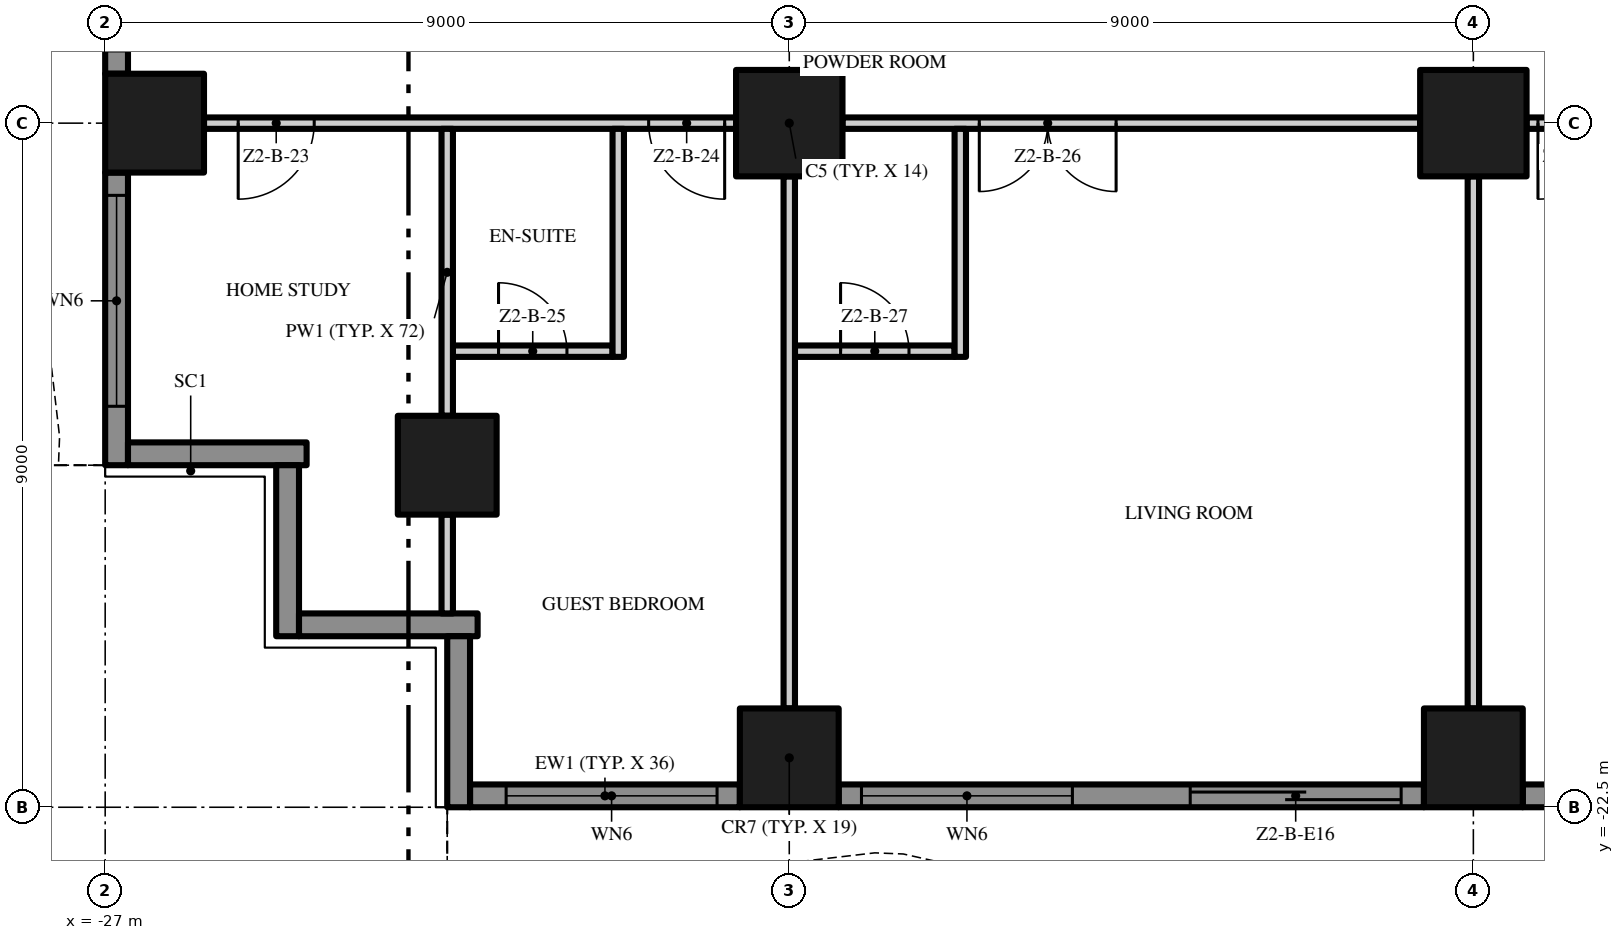
"""IFC4 building model, lengths in metres.
Left out: names, types, materials, properties, quantities, classifications, styles, units other than length and angle.
Written with IfcOpenShell. Run it as: python <this file> out.ifc"""

import sys

from ifc_helpers import new_model, si_unit, direction, frame, frame_2d, origin, origin_2d, place, context, subcontext, project, spatial, polyline, rectangle, outline, extrude, element, fill, save


model = new_model("IFC4")
c1 = context("Model", 3, precision=1e-05, world=origin(), true_north=direction((0.0, 1.0)))
c2 = subcontext(c1, "Body", "Model", "MODEL_VIEW")
j1 = project(units=[si_unit("LENGTHUNIT", "METRE"), si_unit("PLANEANGLEUNIT", "RADIAN")], contexts=[c1])
p1 = place(None, origin())
s1 = spatial("IfcSite", under=j1, at=p1, CompositionType="ELEMENT")
p2 = place(p1, origin())
s2 = spatial("IfcBuilding", under=s1, at=p2, CompositionType="ELEMENT")
p3 = place(p2, frame((0.0, 0.0, 88.4)))
s3 = spatial("IfcBuildingStorey", under=s2, at=p3, CompositionType="ELEMENT", Elevation=88.4)
p4 = place(p3, frame((-18.0, -13.5, 0.0), z_axis=(0.0, 0.0, 1.0), x_axis=(1.0, 0.0, 0.0)))
e1 = element("IfcColumn", 1, at=p4, inside=s3, PredefinedType="COLUMN", context=c2, shape_type="SweptSolid", body=[
    extrude(rectangle(XDim=1.4, YDim=1.4, at=origin_2d()), origin(), (0.0, 0.0, 1.0), 3.5),
])
for number, where, z_axis, x_axis in (
    (2, (-18.0, -21.85, 0.0), (0.0, 0.0, 1.0), (1.0, 0.0, 0.0)),
    (3, (-26.35, -13.5, 0.0), (0.0, 0.0, 1.0), (1.0, 0.0, 0.0)),
    (4, (-22.5, -18.0, 0.0), (0.0, 0.0, 1.0), (1.0, 0.0, 0.0)),
):
    element("IfcColumn", number, at=place(p3, frame(where, z_axis=z_axis, x_axis=x_axis)), inside=s3, PredefinedType="COLUMN", context=c2, shape_type="SweptSolid", body=[
        extrude(rectangle(XDim=1.3, YDim=1.3, at=origin_2d()), origin(), (0.0, 0.0, 1.0), 3.5),
    ])
p5 = place(p3, frame((-9.0, -13.5, 0.0), z_axis=(0.0, 0.0, 1.0), x_axis=(1.0, 0.0, 0.0)))
e5 = element("IfcColumn", 5, at=p5, inside=s3, PredefinedType="COLUMN", context=c2, shape_type="SweptSolid", body=[
    extrude(rectangle(XDim=1.4, YDim=1.4, at=origin_2d()), origin(), (0.0, 0.0, 1.0), 3.5),
])
p6 = place(p3, frame((-9.0, -21.85, 0.0), z_axis=(0.0, 0.0, 1.0), x_axis=(1.0, 0.0, 0.0)))
e6 = element("IfcColumn", 6, at=p6, inside=s3, PredefinedType="COLUMN", context=c2, shape_type="SweptSolid", body=[
    extrude(rectangle(XDim=1.3, YDim=1.3, at=origin_2d()), origin(), (0.0, 0.0, 1.0), 3.5),
])
p7 = place(p3, frame((-18.65, -22.35, 0.0), z_axis=(0.0, 0.0, 1.0), x_axis=(-1.0, 0.0, 0.0)))
e7 = element("IfcWall", 7, at=p7, inside=s3, PredefinedType="SOLIDWALL", context=c2, shape_type="SweptSolid", body=[
    extrude(rectangle(XDim=3.55, YDim=0.3, at=frame_2d((1.775, 0.0))), origin(), (0.0, 0.0, 1.0), 3.5),
])
p8 = place(p7, frame((0.3, 0.0, 0.45)))
e8 = element("IfcOpeningElement", 8, at=p8, cuts=e7, PredefinedType="OPENING", context=c2, shape_type="SweptSolid", body=[
    extrude(rectangle(XDim=2.775, YDim=2.65, at=frame_2d((1.387, 1.325))), frame((0.0, 0.16, 0.0), z_axis=(0.0, -1.0, 0.0), x_axis=(1.0, 0.0, 0.0)), (0.0, 0.0, 1.0), 0.32),
])
p9 = place(p3, frame((-9.65, -22.35, 0.0), z_axis=(0.0, 0.0, 1.0), x_axis=(-1.0, 0.0, 0.0)))
e9 = element("IfcWall", 9, at=p9, inside=s3, PredefinedType="SOLIDWALL", context=c2, shape_type="SweptSolid", body=[
    extrude(rectangle(XDim=7.7, YDim=0.3, at=frame_2d((3.85, 0.0))), origin(), (0.0, 0.0, 1.0), 3.5),
])
p10 = place(p9, frame((4.625, 0.0, 0.45)))
e10 = element("IfcOpeningElement", 10, at=p10, cuts=e9, PredefinedType="OPENING", context=c2, shape_type="SweptSolid", body=[
    extrude(rectangle(XDim=2.775, YDim=2.65, at=frame_2d((1.387, 1.325))), frame((0.0, 0.16, 0.0), z_axis=(0.0, -1.0, 0.0), x_axis=(1.0, 0.0, 0.0)), (0.0, 0.0, 1.0), 0.32),
])
p11 = place(p9, frame((0.3, 0.0, 0.0)))
e11 = element("IfcOpeningElement", 11, at=p11, cuts=e9, PredefinedType="OPENING", context=c2, shape_type="SweptSolid", body=[
    extrude(rectangle(XDim=2.775, YDim=2.4, at=frame_2d((1.387, 1.2))), frame((0.0, 0.16, 0.0), z_axis=(0.0, -1.0, 0.0), x_axis=(1.0, 0.0, 0.0)), (0.0, 0.0, 1.0), 0.32),
])
p12 = place(p3, frame((-0.65, -22.35, 0.0), z_axis=(0.0, 0.0, 1.0), x_axis=(-1.0, 0.0, 0.0)))
e12 = element("IfcWall", 12, at=p12, inside=s3, PredefinedType="SOLIDWALL", context=c2, shape_type="SweptSolid", body=[
    extrude(rectangle(XDim=7.7, YDim=0.3, at=frame_2d((3.85, 0.0))), origin(), (0.0, 0.0, 1.0), 3.5),
])
p13 = place(p12, frame((4.625, 0.0, 0.0)))
e13 = element("IfcOpeningElement", 13, at=p13, cuts=e12, PredefinedType="OPENING", context=c2, shape_type="SweptSolid", body=[
    extrude(rectangle(XDim=2.775, YDim=2.4, at=frame_2d((1.387, 1.2))), frame((0.0, 0.16, 0.0), z_axis=(0.0, -1.0, 0.0), x_axis=(1.0, 0.0, 0.0)), (0.0, 0.0, 1.0), 0.32),
])
p14 = place(p12, frame((0.3, 0.0, 0.45)))
e14 = element("IfcOpeningElement", 14, at=p14, cuts=e12, PredefinedType="OPENING", context=c2, shape_type="SweptSolid", body=[
    extrude(rectangle(XDim=2.775, YDim=2.65, at=frame_2d((1.387, 1.325))), frame((0.0, 0.16, 0.0), z_axis=(0.0, -1.0, 0.0), x_axis=(1.0, 0.0, 0.0)), (0.0, 0.0, 1.0), 0.32),
])
p15 = place(p3, frame((-26.85, -12.85, 0.0), z_axis=(0.0, 0.0, 1.0), x_axis=(0.0, 1.0, 0.0)))
e15 = element("IfcWall", 15, at=p15, inside=s3, PredefinedType="SOLIDWALL", context=c2, shape_type="SweptSolid", body=[
    extrude(rectangle(XDim=7.7, YDim=0.3, at=frame_2d((3.85, 0.0))), origin(), (0.0, 0.0, 1.0), 3.5),
])
p16 = place(p15, frame((4.625, 0.0, 0.45)))
e16 = element("IfcOpeningElement", 16, at=p16, cuts=e15, PredefinedType="OPENING", context=c2, shape_type="SweptSolid", body=[
    extrude(rectangle(XDim=2.775, YDim=2.65, at=frame_2d((1.387, 1.325))), frame((0.0, 0.16, 0.0), z_axis=(0.0, -1.0, 0.0), x_axis=(1.0, 0.0, 0.0)), (0.0, 0.0, 1.0), 0.32),
])
p17 = place(p15, frame((0.3, 0.0, 0.0)))
e17 = element("IfcOpeningElement", 17, at=p17, cuts=e15, PredefinedType="OPENING", context=c2, shape_type="SweptSolid", body=[
    extrude(rectangle(XDim=2.775, YDim=2.4, at=frame_2d((1.387, 1.2))), frame((0.0, 0.16, 0.0), z_axis=(0.0, -1.0, 0.0), x_axis=(1.0, 0.0, 0.0)), (0.0, 0.0, 1.0), 0.32),
])
p18 = place(p3, frame((-26.85, -18.0, 0.0), z_axis=(0.0, 0.0, 1.0), x_axis=(0.0, 1.0, 0.0)))
e18 = element("IfcWall", 18, at=p18, inside=s3, PredefinedType="SOLIDWALL", context=c2, shape_type="SweptSolid", body=[
    extrude(rectangle(XDim=3.85, YDim=0.3, at=frame_2d((1.925, 0.0))), origin(), (0.0, 0.0, 1.0), 3.5),
])
p19 = place(p18, frame((0.775, 0.0, 0.45)))
e19 = element("IfcOpeningElement", 19, at=p19, cuts=e18, PredefinedType="OPENING", context=c2, shape_type="SweptSolid", body=[
    extrude(rectangle(XDim=2.775, YDim=2.65, at=frame_2d((1.387, 1.325))), frame((0.0, 0.16, 0.0), z_axis=(0.0, -1.0, 0.0), x_axis=(1.0, 0.0, 0.0)), (0.0, 0.0, 1.0), 0.32),
])
p20 = place(p3, frame((-24.35, -17.85, 0.0), z_axis=(0.0, 0.0, 1.0), x_axis=(-1.0, 0.0, 0.0)))
e20 = element("IfcWall", 20, at=p20, inside=s3, PredefinedType="SOLIDWALL", context=c2, shape_type="SweptSolid", body=[
    extrude(rectangle(XDim=2.35, YDim=0.3, at=frame_2d((1.175, 0.0))), origin(), (0.0, 0.0, 1.0), 3.5),
])
p21 = place(p3, frame((-24.6, -20.25, 0.0), z_axis=(0.0, 0.0, 1.0), x_axis=(0.0, 1.0, 0.0)))
e21 = element("IfcWall", 21, at=p21, inside=s3, PredefinedType="SOLIDWALL", context=c2, shape_type="SweptSolid", body=[
    extrude(rectangle(XDim=2.25, YDim=0.3, at=frame_2d((1.125, 0.0))), origin(), (0.0, 0.0, 1.0), 3.5),
])
p22 = place(p3, frame((-22.1, -20.1, 0.0), z_axis=(0.0, 0.0, 1.0), x_axis=(-1.0, 0.0, 0.0)))
e22 = element("IfcWall", 22, at=p22, inside=s3, PredefinedType="SOLIDWALL", context=c2, shape_type="SweptSolid", body=[
    extrude(rectangle(XDim=2.35, YDim=0.3, at=frame_2d((1.175, 0.0))), origin(), (0.0, 0.0, 1.0), 3.5),
])
p23 = place(p3, frame((-22.35, -22.5, 0.0), z_axis=(0.0, 0.0, 1.0), x_axis=(0.0, 1.0, 0.0)))
e23 = element("IfcWall", 23, at=p23, inside=s3, PredefinedType="SOLIDWALL", context=c2, shape_type="SweptSolid", body=[
    extrude(rectangle(XDim=2.25, YDim=0.3, at=frame_2d((1.125, 0.0))), origin(), (0.0, 0.0, 1.0), 3.5),
])
p24 = place(p3, origin())
e24 = element("IfcWall", 24, at=p24, inside=s3, PredefinedType="USERDEFINED", context=c2, shape_type="SweptSolid", body=[
    extrude(outline(polyline([(-22.5, -25.149), (-21.0, -24.488), (-19.5, -23.755), (-18.0, -23.231), (-16.875, -23.1), (-16.5, -23.115), (-15.0, -23.451), (-13.5, -24.112), (-12.0, -24.845), (-10.5, -25.369), (-9.375, -25.5), (-9.0, -25.485), (-7.5, -25.149), (-6.0, -24.488), (-4.5, -23.755), (-3.0, -23.231), (-1.875, -23.1), (-1.5, -23.115), (0.0, -23.451), (1.5, -24.112), (3.0, -24.845), (4.5, -25.369), (5.625, -25.5), (6.0, -25.485), (7.5, -25.149), (9.0, -24.488), (10.5, -23.755), (12.0, -23.231), (13.125, -23.1), (13.5, -23.115), (15.0, -23.451), (16.5, -24.112), (18.0, -24.845), (19.5, -25.369), (20.625, -25.5), (21.0, -25.485), (22.5, -25.149), (22.445, -24.905), (20.967, -25.236), (20.635, -25.249), (19.556, -25.124), (18.096, -24.614), (16.605, -23.885), (15.079, -23.213), (13.533, -22.866), (13.115, -22.849), (11.944, -22.986), (10.404, -23.524), (8.895, -24.261), (7.421, -24.91), (5.967, -25.236), (5.635, -25.249), (4.556, -25.124), (3.096, -24.614), (1.605, -23.885), (0.079, -23.213), (-1.467, -22.866), (-1.885, -22.849), (-3.056, -22.986), (-4.596, -23.524), (-6.105, -24.261), (-7.579, -24.91), (-9.033, -25.236), (-9.365, -25.249), (-10.444, -25.124), (-11.904, -24.614), (-13.395, -23.885), (-14.921, -23.213), (-16.467, -22.866), (-16.885, -22.849), (-18.056, -22.986), (-19.596, -23.524), (-21.105, -24.261), (-22.601, -24.92), (-22.5, -25.149)])), origin(), (0.0, 0.0, 1.0), 0.9),
])
p25 = place(p3, origin())
e25 = element("IfcWall", 25, at=p25, inside=s3, PredefinedType="USERDEFINED", context=c2, shape_type="SweptSolid", body=[
    extrude(outline(polyline([(-29.649, 18.0), (-28.988, 16.5), (-28.255, 15.0), (-27.731, 13.5), (-27.6, 12.375), (-27.615, 12.0), (-27.951, 10.5), (-28.612, 9.0), (-29.345, 7.5), (-29.869, 6.0), (-30.0, 4.875), (-29.985, 4.5), (-29.649, 3.0), (-28.988, 1.5), (-28.255, 0.0), (-27.731, -1.5), (-27.6, -2.625), (-27.615, -3.0), (-27.951, -4.5), (-28.612, -6.0), (-29.345, -7.5), (-29.869, -9.0), (-30.0, -10.125), (-29.985, -10.5), (-29.649, -12.0), (-28.988, -13.5), (-28.255, -15.0), (-27.731, -16.5), (-27.6, -17.625), (-27.615, -18.0), (-27.365, -18.01), (-27.349, -17.615), (-27.486, -16.444), (-28.024, -14.904), (-28.761, -13.395), (-29.41, -11.921), (-29.736, -10.467), (-29.749, -10.135), (-29.624, -9.056), (-29.114, -7.596), (-28.385, -6.105), (-27.713, -4.579), (-27.366, -3.033), (-27.349, -2.615), (-27.486, -1.444), (-28.024, 0.096), (-28.761, 1.605), (-29.41, 3.079), (-29.736, 4.533), (-29.749, 4.865), (-29.624, 5.944), (-29.114, 7.404), (-28.385, 8.895), (-27.713, 10.421), (-27.366, 11.967), (-27.349, 12.385), (-27.486, 13.556), (-28.024, 15.096), (-28.761, 16.605), (-29.42, 18.101), (-29.649, 18.0)])), origin(), (0.0, 0.0, 1.0), 0.9),
])
p26 = place(p3, frame((-22.425, -16.5, 0.0), z_axis=(0.0, 0.0, 1.0), x_axis=(1.0, 0.0, 0.0)))
e26 = element("IfcWall", 26, at=p26, inside=s3, PredefinedType="PARTITIONING", context=c2, shape_type="SweptSolid", body=[
    extrude(rectangle(XDim=2.1, YDim=0.15, at=frame_2d((1.05, 0.0))), origin(), (0.0, 0.0, 1.0), 3.5),
])
p27 = place(p26, frame((0.6, 0.0, 0.0)))
e27 = element("IfcOpeningElement", 27, at=p27, cuts=e26, PredefinedType="OPENING", context=c2, shape_type="SweptSolid", body=[
    extrude(rectangle(XDim=0.9, YDim=2.1, at=frame_2d((0.45, 1.05))), frame((0.0, 0.085, 0.0), z_axis=(0.0, -1.0, 0.0), x_axis=(1.0, 0.0, 0.0)), (0.0, 0.0, 1.0), 0.17),
])
p28 = place(p3, frame((-17.925, -16.5, 0.0), z_axis=(0.0, 0.0, 1.0), x_axis=(1.0, 0.0, 0.0)))
e28 = element("IfcWall", 28, at=p28, inside=s3, PredefinedType="PARTITIONING", context=c2, shape_type="SweptSolid", body=[
    extrude(rectangle(XDim=2.1, YDim=0.15, at=frame_2d((1.05, 0.0))), origin(), (0.0, 0.0, 1.0), 3.5),
])
p29 = place(p28, frame((0.6, 0.0, 0.0)))
e29 = element("IfcOpeningElement", 29, at=p29, cuts=e28, PredefinedType="OPENING", context=c2, shape_type="SweptSolid", body=[
    extrude(rectangle(XDim=0.9, YDim=2.1, at=frame_2d((0.45, 1.05))), frame((0.0, 0.085, 0.0), z_axis=(0.0, -1.0, 0.0), x_axis=(1.0, 0.0, 0.0)), (0.0, 0.0, 1.0), 0.17),
])
p30 = place(p3, frame((-18.7, -13.5, 0.0), z_axis=(0.0, 0.0, 1.0), x_axis=(-1.0, 0.0, 0.0)))
e30 = element("IfcWall", 30, at=p30, inside=s3, PredefinedType="PARTITIONING", context=c2, shape_type="SweptSolid", body=[
    extrude(rectangle(XDim=7.0, YDim=0.15, at=frame_2d((3.5, 0.0))), origin(), (0.0, 0.0, 1.0), 3.5),
])
p31 = place(p30, frame((5.55, 0.0, 0.0)))
e31 = element("IfcOpeningElement", 31, at=p31, cuts=e30, PredefinedType="OPENING", context=c2, shape_type="SweptSolid", body=[
    extrude(rectangle(XDim=1.0, YDim=2.4, at=frame_2d((0.5, 1.2))), frame((0.0, 0.085, 0.0), z_axis=(0.0, -1.0, 0.0), x_axis=(1.0, 0.0, 0.0)), (0.0, 0.0, 1.0), 0.17),
])
p32 = place(p30, frame((0.15, 0.0, 0.0)))
e32 = element("IfcOpeningElement", 32, at=p32, cuts=e30, PredefinedType="OPENING", context=c2, shape_type="SweptSolid", body=[
    extrude(rectangle(XDim=1.0, YDim=2.4, at=frame_2d((0.5, 1.2))), frame((0.0, 0.085, 0.0), z_axis=(0.0, -1.0, 0.0), x_axis=(1.0, 0.0, 0.0)), (0.0, 0.0, 1.0), 0.17),
])
p33 = place(p3, frame((-9.7, -13.5, 0.0), z_axis=(0.0, 0.0, 1.0), x_axis=(-1.0, 0.0, 0.0)))
e33 = element("IfcWall", 33, at=p33, inside=s3, PredefinedType="PARTITIONING", context=c2, shape_type="SweptSolid", body=[
    extrude(rectangle(XDim=7.6, YDim=0.15, at=frame_2d((3.8, 0.0))), origin(), (0.0, 0.0, 1.0), 3.5),
])
p34 = place(p33, frame((4.0, 0.0, 0.0)))
e34 = element("IfcOpeningElement", 34, at=p34, cuts=e33, PredefinedType="OPENING", context=c2, shape_type="SweptSolid", body=[
    extrude(rectangle(XDim=1.8, YDim=2.4, at=frame_2d((0.9, 1.2))), frame((0.0, 0.085, 0.0), z_axis=(0.0, -1.0, 0.0), x_axis=(1.0, 0.0, 0.0)), (0.0, 0.0, 1.0), 0.17),
])
p35 = place(p3, frame((-0.7, -13.5, 0.0), z_axis=(0.0, 0.0, 1.0), x_axis=(-1.0, 0.0, 0.0)))
e35 = element("IfcWall", 35, at=p35, inside=s3, PredefinedType="PARTITIONING", context=c2, shape_type="SweptSolid", body=[
    extrude(rectangle(XDim=7.6, YDim=0.15, at=frame_2d((3.8, 0.0))), origin(), (0.0, 0.0, 1.0), 3.5),
])
p36 = place(p35, frame((6.45, 0.0, 0.0)))
e36 = element("IfcOpeningElement", 36, at=p36, cuts=e35, PredefinedType="OPENING", context=c2, shape_type="SweptSolid", body=[
    extrude(rectangle(XDim=1.0, YDim=2.4, at=frame_2d((0.5, 1.2))), frame((0.0, 0.085, 0.0), z_axis=(0.0, -1.0, 0.0), x_axis=(1.0, 0.0, 0.0)), (0.0, 0.0, 1.0), 0.17),
])
p37 = place(p35, frame((0.15, 0.0, 0.0)))
e37 = element("IfcOpeningElement", 37, at=p37, cuts=e35, PredefinedType="OPENING", context=c2, shape_type="SweptSolid", body=[
    extrude(rectangle(XDim=1.0, YDim=2.4, at=frame_2d((0.5, 1.2))), frame((0.0, 0.085, 0.0), z_axis=(0.0, -1.0, 0.0), x_axis=(1.0, 0.0, 0.0)), (0.0, 0.0, 1.0), 0.17),
])
p38 = place(p3, frame((-22.5, -19.95, 0.0), z_axis=(0.0, 0.0, 1.0), x_axis=(0.0, 1.0, 0.0)))
e38 = element("IfcWall", 38, at=p38, inside=s3, PredefinedType="PARTITIONING", context=c2, shape_type="SweptSolid", body=[
    extrude(rectangle(XDim=1.3, YDim=0.15, at=frame_2d((0.65, 0.0))), origin(), (0.0, 0.0, 1.0), 3.5),
])
p39 = place(p3, frame((-22.5, -17.35, 0.0), z_axis=(0.0, 0.0, 1.0), x_axis=(0.0, 1.0, 0.0)))
e39 = element("IfcWall", 39, at=p39, inside=s3, PredefinedType="PARTITIONING", context=c2, shape_type="SweptSolid", body=[
    extrude(rectangle(XDim=3.775, YDim=0.15, at=frame_2d((1.887, 0.0))), origin(), (0.0, 0.0, 1.0), 3.5),
])
p40 = place(p3, frame((-20.25, -16.575, 0.0), z_axis=(0.0, 0.0, 1.0), x_axis=(0.0, 1.0, 0.0)))
e40 = element("IfcWall", 40, at=p40, inside=s3, PredefinedType="PARTITIONING", context=c2, shape_type="SweptSolid", body=[
    extrude(rectangle(XDim=3.0, YDim=0.15, at=frame_2d((1.5, 0.0))), origin(), (0.0, 0.0, 1.0), 3.5),
])
p41 = place(p3, frame((-18.0, -21.2, 0.0), z_axis=(0.0, 0.0, 1.0), x_axis=(0.0, 1.0, 0.0)))
e41 = element("IfcWall", 41, at=p41, inside=s3, PredefinedType="PARTITIONING", context=c2, shape_type="SweptSolid", body=[
    extrude(rectangle(XDim=7.0, YDim=0.15, at=frame_2d((3.5, 0.0))), origin(), (0.0, 0.0, 1.0), 3.5),
])
p42 = place(p3, frame((-15.75, -16.575, 0.0), z_axis=(0.0, 0.0, 1.0), x_axis=(0.0, 1.0, 0.0)))
e42 = element("IfcWall", 42, at=p42, inside=s3, PredefinedType="PARTITIONING", context=c2, shape_type="SweptSolid", body=[
    extrude(rectangle(XDim=3.0, YDim=0.15, at=frame_2d((1.5, 0.0))), origin(), (0.0, 0.0, 1.0), 3.5),
])
p43 = place(p3, frame((-9.0, -21.2, 0.0), z_axis=(0.0, 0.0, 1.0), x_axis=(0.0, 1.0, 0.0)))
e43 = element("IfcWall", 43, at=p43, inside=s3, PredefinedType="PARTITIONING", context=c2, shape_type="SweptSolid", body=[
    extrude(rectangle(XDim=7.0, YDim=0.15, at=frame_2d((3.5, 0.0))), origin(), (0.0, 0.0, 1.0), 3.5),
])
p44 = place(p8, origin())
e44 = element("IfcWindow", 44, at=p44, inside=s3, PartitioningType="SINGLE_PANEL", PredefinedType="WINDOW", context=c2, shape_type="SweptSolid", body=[
    extrude(rectangle(XDim=2.775, YDim=2.65, at=frame_2d((1.387, 1.325))), frame((0.0, 0.03, 0.0), z_axis=(0.0, -1.0, 0.0), x_axis=(1.0, 0.0, 0.0)), (0.0, 0.0, 1.0), 0.06),
])
fill(e8, e44)
p45 = place(p10, origin())
e45 = element("IfcWindow", 45, at=p45, inside=s3, PartitioningType="SINGLE_PANEL", PredefinedType="WINDOW", context=c2, shape_type="SweptSolid", body=[
    extrude(rectangle(XDim=2.775, YDim=2.65, at=frame_2d((1.387, 1.325))), frame((0.0, 0.03, 0.0), z_axis=(0.0, -1.0, 0.0), x_axis=(1.0, 0.0, 0.0)), (0.0, 0.0, 1.0), 0.06),
])
fill(e10, e45)
p46 = place(p11, origin())
e46 = element("IfcDoor", 46, at=p46, inside=s3, OperationType="SINGLE_SWING_LEFT", PredefinedType="DOOR", context=c2, shape_type="SweptSolid", body=[
    extrude(rectangle(XDim=2.775, YDim=2.4, at=frame_2d((1.387, 1.2))), frame((0.0, 0.025, 0.0), z_axis=(0.0, -1.0, 0.0), x_axis=(1.0, 0.0, 0.0)), (0.0, 0.0, 1.0), 0.05),
])
fill(e11, e46)
p47 = place(p19, origin())
e47 = element("IfcWindow", 47, at=p47, inside=s3, PartitioningType="SINGLE_PANEL", PredefinedType="WINDOW", context=c2, shape_type="SweptSolid", body=[
    extrude(rectangle(XDim=2.775, YDim=2.65, at=frame_2d((1.387, 1.325))), frame((0.0, 0.03, 0.0), z_axis=(0.0, -1.0, 0.0), x_axis=(1.0, 0.0, 0.0)), (0.0, 0.0, 1.0), 0.06),
])
fill(e19, e47)
p48 = place(p31, origin())
e48 = element("IfcDoor", 48, at=p48, inside=s3, OperationType="SINGLE_SWING_RIGHT", PredefinedType="DOOR", context=c2, shape_type="SweptSolid", body=[
    extrude(rectangle(XDim=1.0, YDim=2.4, at=frame_2d((0.5, 1.2))), frame((0.0, 0.025, 0.0), z_axis=(0.0, -1.0, 0.0), x_axis=(1.0, 0.0, 0.0)), (0.0, 0.0, 1.0), 0.05),
])
fill(e31, e48)
p49 = place(p32, origin())
e49 = element("IfcDoor", 49, at=p49, inside=s3, OperationType="SINGLE_SWING_LEFT", PredefinedType="DOOR", context=c2, shape_type="SweptSolid", body=[
    extrude(rectangle(XDim=1.0, YDim=2.4, at=frame_2d((0.5, 1.2))), frame((0.0, 0.025, 0.0), z_axis=(0.0, -1.0, 0.0), x_axis=(1.0, 0.0, 0.0)), (0.0, 0.0, 1.0), 0.05),
])
fill(e32, e49)
p50 = place(p27, origin())
e50 = element("IfcDoor", 50, at=p50, inside=s3, OperationType="SINGLE_SWING_LEFT", PredefinedType="DOOR", context=c2, shape_type="SweptSolid", body=[
    extrude(rectangle(XDim=0.9, YDim=2.1, at=frame_2d((0.45, 1.05))), frame((0.0, 0.025, 0.0), z_axis=(0.0, -1.0, 0.0), x_axis=(1.0, 0.0, 0.0)), (0.0, 0.0, 1.0), 0.05),
])
fill(e27, e50)
p51 = place(p34, origin())
e51 = element("IfcDoor", 51, at=p51, inside=s3, OperationType="DOUBLE_DOOR_SINGLE_SWING", PredefinedType="DOOR", context=c2, shape_type="SweptSolid", body=[
    extrude(rectangle(XDim=1.8, YDim=2.4, at=frame_2d((0.9, 1.2))), frame((0.0, 0.025, 0.0), z_axis=(0.0, -1.0, 0.0), x_axis=(1.0, 0.0, 0.0)), (0.0, 0.0, 1.0), 0.05),
])
fill(e34, e51)
p52 = place(p29, origin())
e52 = element("IfcDoor", 52, at=p52, inside=s3, OperationType="SINGLE_SWING_LEFT", PredefinedType="DOOR", context=c2, shape_type="SweptSolid", body=[
    extrude(rectangle(XDim=0.9, YDim=2.1, at=frame_2d((0.45, 1.05))), frame((0.0, 0.025, 0.0), z_axis=(0.0, -1.0, 0.0), x_axis=(1.0, 0.0, 0.0)), (0.0, 0.0, 1.0), 0.05),
])
fill(e29, e52)
p53 = place(p36, origin())
e53 = element("IfcDoor", 53, at=p53, inside=s3, OperationType="SINGLE_SWING_RIGHT", PredefinedType="DOOR", context=c2, shape_type="SweptSolid", body=[
    extrude(rectangle(XDim=1.0, YDim=2.4, at=frame_2d((0.5, 1.2))), frame((0.0, 0.025, 0.0), z_axis=(0.0, -1.0, 0.0), x_axis=(1.0, 0.0, 0.0)), (0.0, 0.0, 1.0), 0.05),
])
fill(e36, e53)
save(model, sys.argv[1])
